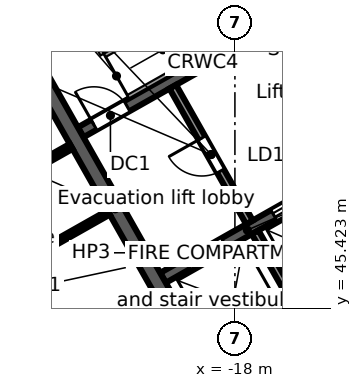
"""IFC4 building model, lengths in metres.
Left out: names, types, materials, properties, quantities, classifications, styles, units other than length and angle.
Written with IfcOpenShell. Run it as: python <this file> out.ifc"""

import sys

from ifc_helpers import new_model, si_unit, direction, frame, frame_2d, origin, place, context, subcontext, project, spatial, rectangle, extrude, element, fill, save


model = new_model("IFC4")
c1 = context("Model", 3, precision=1e-05, world=origin(), true_north=direction((0.0, 1.0)))
c2 = subcontext(c1, "Body", "Model", "MODEL_VIEW")
j1 = project(units=[si_unit("LENGTHUNIT", "METRE"), si_unit("PLANEANGLEUNIT", "RADIAN")], contexts=[c1])
p1 = place(None, origin())
s1 = spatial("IfcSite", under=j1, at=p1, CompositionType="ELEMENT")
p2 = place(p1, origin())
s2 = spatial("IfcBuilding", under=s1, at=p2, CompositionType="ELEMENT")
p3 = place(p2, frame((0.0, 0.0, 274.1)))
s3 = spatial("IfcBuildingStorey", under=s2, at=p3, CompositionType="ELEMENT", Elevation=274.1)
p4 = place(p3, frame((-58.732, 38.771, 0.0), z_axis=(0.0, 0.0, 1.0), x_axis=(0.870355615581, 0.492423702137, 0.0)))
e1 = element("IfcWall", 1, at=p4, inside=s3, PredefinedType="STANDARD", context=c2, shape_type="SweptSolid", body=[
    extrude(rectangle(XDim=64.052, YDim=0.25, at=frame_2d((32.026, 0.0))), origin(), (0.0, 0.0, 1.0), 3.52),
])
p5 = place(p4, frame((61.259, 0.0, 0.8)))
e2 = element("IfcOpeningElement", 2, at=p5, cuts=e1, PredefinedType="OPENING", context=c2, shape_type="SweptSolid", body=[
    extrude(rectangle(XDim=2.4, YDim=2.2, at=frame_2d((1.2, 1.1))), frame((0.0, 0.135, 0.0), z_axis=(0.0, -1.0, 0.0), x_axis=(1.0, 0.0, 0.0)), (0.0, 0.0, 1.0), 0.27),
])
p6 = place(p4, frame((58.216, 0.0, 0.8)))
e3 = element("IfcOpeningElement", 3, at=p6, cuts=e1, PredefinedType="OPENING", context=c2, shape_type="SweptSolid", body=[
    extrude(rectangle(XDim=2.4, YDim=2.2, at=frame_2d((1.2, 1.1))), frame((0.0, 0.135, 0.0), z_axis=(0.0, -1.0, 0.0), x_axis=(1.0, 0.0, 0.0)), (0.0, 0.0, 1.0), 0.27),
])
p7 = place(p4, frame((55.173, 0.0, 0.8)))
e4 = element("IfcOpeningElement", 4, at=p7, cuts=e1, PredefinedType="OPENING", context=c2, shape_type="SweptSolid", body=[
    extrude(rectangle(XDim=2.4, YDim=2.2, at=frame_2d((1.2, 1.1))), frame((0.0, 0.135, 0.0), z_axis=(0.0, -1.0, 0.0), x_axis=(1.0, 0.0, 0.0)), (0.0, 0.0, 1.0), 0.27),
])
p8 = place(p4, frame((52.129, 0.0, 0.8)))
e5 = element("IfcOpeningElement", 5, at=p8, cuts=e1, PredefinedType="OPENING", context=c2, shape_type="SweptSolid", body=[
    extrude(rectangle(XDim=2.4, YDim=2.2, at=frame_2d((1.2, 1.1))), frame((0.0, 0.135, 0.0), z_axis=(0.0, -1.0, 0.0), x_axis=(1.0, 0.0, 0.0)), (0.0, 0.0, 1.0), 0.27),
])
p9 = place(p4, frame((49.086, 0.0, 0.8)))
e6 = element("IfcOpeningElement", 6, at=p9, cuts=e1, PredefinedType="OPENING", context=c2, shape_type="SweptSolid", body=[
    extrude(rectangle(XDim=2.4, YDim=2.2, at=frame_2d((1.2, 1.1))), frame((0.0, 0.135, 0.0), z_axis=(0.0, -1.0, 0.0), x_axis=(1.0, 0.0, 0.0)), (0.0, 0.0, 1.0), 0.27),
])
p10 = place(p4, frame((46.043, 0.0, 0.8)))
e7 = element("IfcOpeningElement", 7, at=p10, cuts=e1, PredefinedType="OPENING", context=c2, shape_type="SweptSolid", body=[
    extrude(rectangle(XDim=2.4, YDim=2.2, at=frame_2d((1.2, 1.1))), frame((0.0, 0.135, 0.0), z_axis=(0.0, -1.0, 0.0), x_axis=(1.0, 0.0, 0.0)), (0.0, 0.0, 1.0), 0.27),
])
p11 = place(p4, frame((43.0, 0.0, 0.8)))
e8 = element("IfcOpeningElement", 8, at=p11, cuts=e1, PredefinedType="OPENING", context=c2, shape_type="SweptSolid", body=[
    extrude(rectangle(XDim=2.4, YDim=2.2, at=frame_2d((1.2, 1.1))), frame((0.0, 0.135, 0.0), z_axis=(0.0, -1.0, 0.0), x_axis=(1.0, 0.0, 0.0)), (0.0, 0.0, 1.0), 0.27),
])
p12 = place(p4, frame((39.956, 0.0, 0.8)))
e9 = element("IfcOpeningElement", 9, at=p12, cuts=e1, PredefinedType="OPENING", context=c2, shape_type="SweptSolid", body=[
    extrude(rectangle(XDim=2.4, YDim=2.2, at=frame_2d((1.2, 1.1))), frame((0.0, 0.135, 0.0), z_axis=(0.0, -1.0, 0.0), x_axis=(1.0, 0.0, 0.0)), (0.0, 0.0, 1.0), 0.27),
])
p13 = place(p4, frame((36.913, 0.0, 0.8)))
e10 = element("IfcOpeningElement", 10, at=p13, cuts=e1, PredefinedType="OPENING", context=c2, shape_type="SweptSolid", body=[
    extrude(rectangle(XDim=2.4, YDim=2.2, at=frame_2d((1.2, 1.1))), frame((0.0, 0.135, 0.0), z_axis=(0.0, -1.0, 0.0), x_axis=(1.0, 0.0, 0.0)), (0.0, 0.0, 1.0), 0.27),
])
p14 = place(p4, frame((33.87, 0.0, 0.8)))
e11 = element("IfcOpeningElement", 11, at=p14, cuts=e1, PredefinedType="OPENING", context=c2, shape_type="SweptSolid", body=[
    extrude(rectangle(XDim=2.4, YDim=2.2, at=frame_2d((1.2, 1.1))), frame((0.0, 0.135, 0.0), z_axis=(0.0, -1.0, 0.0), x_axis=(1.0, 0.0, 0.0)), (0.0, 0.0, 1.0), 0.27),
])
p15 = place(p4, frame((30.826, 0.0, 0.8)))
e12 = element("IfcOpeningElement", 12, at=p15, cuts=e1, PredefinedType="OPENING", context=c2, shape_type="SweptSolid", body=[
    extrude(rectangle(XDim=2.4, YDim=2.2, at=frame_2d((1.2, 1.1))), frame((0.0, 0.135, 0.0), z_axis=(0.0, -1.0, 0.0), x_axis=(1.0, 0.0, 0.0)), (0.0, 0.0, 1.0), 0.27),
])
p16 = place(p4, frame((27.783, 0.0, 0.8)))
e13 = element("IfcOpeningElement", 13, at=p16, cuts=e1, PredefinedType="OPENING", context=c2, shape_type="SweptSolid", body=[
    extrude(rectangle(XDim=2.4, YDim=2.2, at=frame_2d((1.2, 1.1))), frame((0.0, 0.135, 0.0), z_axis=(0.0, -1.0, 0.0), x_axis=(1.0, 0.0, 0.0)), (0.0, 0.0, 1.0), 0.27),
])
p17 = place(p4, frame((24.74, 0.0, 0.8)))
e14 = element("IfcOpeningElement", 14, at=p17, cuts=e1, PredefinedType="OPENING", context=c2, shape_type="SweptSolid", body=[
    extrude(rectangle(XDim=2.4, YDim=2.2, at=frame_2d((1.2, 1.1))), frame((0.0, 0.135, 0.0), z_axis=(0.0, -1.0, 0.0), x_axis=(1.0, 0.0, 0.0)), (0.0, 0.0, 1.0), 0.27),
])
p18 = place(p4, frame((21.696, 0.0, 0.8)))
e15 = element("IfcOpeningElement", 15, at=p18, cuts=e1, PredefinedType="OPENING", context=c2, shape_type="SweptSolid", body=[
    extrude(rectangle(XDim=2.4, YDim=2.2, at=frame_2d((1.2, 1.1))), frame((0.0, 0.135, 0.0), z_axis=(0.0, -1.0, 0.0), x_axis=(1.0, 0.0, 0.0)), (0.0, 0.0, 1.0), 0.27),
])
p19 = place(p4, frame((18.653, 0.0, 0.8)))
e16 = element("IfcOpeningElement", 16, at=p19, cuts=e1, PredefinedType="OPENING", context=c2, shape_type="SweptSolid", body=[
    extrude(rectangle(XDim=2.4, YDim=2.2, at=frame_2d((1.2, 1.1))), frame((0.0, 0.135, 0.0), z_axis=(0.0, -1.0, 0.0), x_axis=(1.0, 0.0, 0.0)), (0.0, 0.0, 1.0), 0.27),
])
p20 = place(p4, frame((15.61, 0.0, 0.8)))
e17 = element("IfcOpeningElement", 17, at=p20, cuts=e1, PredefinedType="OPENING", context=c2, shape_type="SweptSolid", body=[
    extrude(rectangle(XDim=2.4, YDim=2.2, at=frame_2d((1.2, 1.1))), frame((0.0, 0.135, 0.0), z_axis=(0.0, -1.0, 0.0), x_axis=(1.0, 0.0, 0.0)), (0.0, 0.0, 1.0), 0.27),
])
p21 = place(p4, frame((12.567, 0.0, 0.8)))
e18 = element("IfcOpeningElement", 18, at=p21, cuts=e1, PredefinedType="OPENING", context=c2, shape_type="SweptSolid", body=[
    extrude(rectangle(XDim=2.4, YDim=2.2, at=frame_2d((1.2, 1.1))), frame((0.0, 0.135, 0.0), z_axis=(0.0, -1.0, 0.0), x_axis=(1.0, 0.0, 0.0)), (0.0, 0.0, 1.0), 0.27),
])
p22 = place(p4, frame((9.523, 0.0, 0.8)))
e19 = element("IfcOpeningElement", 19, at=p22, cuts=e1, PredefinedType="OPENING", context=c2, shape_type="SweptSolid", body=[
    extrude(rectangle(XDim=2.4, YDim=2.2, at=frame_2d((1.2, 1.1))), frame((0.0, 0.135, 0.0), z_axis=(0.0, -1.0, 0.0), x_axis=(1.0, 0.0, 0.0)), (0.0, 0.0, 1.0), 0.27),
])
p23 = place(p4, frame((6.48, 0.0, 0.8)))
e20 = element("IfcOpeningElement", 20, at=p23, cuts=e1, PredefinedType="OPENING", context=c2, shape_type="SweptSolid", body=[
    extrude(rectangle(XDim=2.4, YDim=2.2, at=frame_2d((1.2, 1.1))), frame((0.0, 0.135, 0.0), z_axis=(0.0, -1.0, 0.0), x_axis=(1.0, 0.0, 0.0)), (0.0, 0.0, 1.0), 0.27),
])
p24 = place(p4, frame((3.437, 0.0, 0.8)))
e21 = element("IfcOpeningElement", 21, at=p24, cuts=e1, PredefinedType="OPENING", context=c2, shape_type="SweptSolid", body=[
    extrude(rectangle(XDim=2.4, YDim=2.2, at=frame_2d((1.2, 1.1))), frame((0.0, 0.135, 0.0), z_axis=(0.0, -1.0, 0.0), x_axis=(1.0, 0.0, 0.0)), (0.0, 0.0, 1.0), 0.27),
])
p25 = place(p4, frame((0.393, 0.0, 0.8)))
e22 = element("IfcOpeningElement", 22, at=p25, cuts=e1, PredefinedType="OPENING", context=c2, shape_type="SweptSolid", body=[
    extrude(rectangle(XDim=2.4, YDim=2.2, at=frame_2d((1.2, 1.1))), frame((0.0, 0.135, 0.0), z_axis=(0.0, -1.0, 0.0), x_axis=(1.0, 0.0, 0.0)), (0.0, 0.0, 1.0), 0.27),
])
p26 = place(p3, frame((-3.017, 46.293, 0.0), z_axis=(0.0, 0.0, 1.0), x_axis=(-0.870355474887, -0.492423950812, 0.0)))
e23 = element("IfcWall", 23, at=p26, inside=s3, PredefinedType="STANDARD", context=c2, shape_type="SweptSolid", body=[
    extrude(rectangle(XDim=40.34, YDim=0.25, at=frame_2d((20.17, 0.0))), origin(), (0.0, 0.0, 1.0), 3.52),
])
p27 = place(p26, frame((37.428, 0.0, 0.8)))
e24 = element("IfcOpeningElement", 24, at=p27, cuts=e23, PredefinedType="OPENING", context=c2, shape_type="SweptSolid", body=[
    extrude(rectangle(XDim=2.4, YDim=2.2, at=frame_2d((1.2, 1.1))), frame((0.0, 0.135, 0.0), z_axis=(0.0, -1.0, 0.0), x_axis=(1.0, 0.0, 0.0)), (0.0, 0.0, 1.0), 0.27),
])
p28 = place(p26, frame((34.372, 0.0, 0.0)))
e25 = element("IfcOpeningElement", 25, at=p28, cuts=e23, PredefinedType="OPENING", context=c2, shape_type="SweptSolid", body=[
    extrude(rectangle(XDim=1.8, YDim=2.4, at=frame_2d((0.9, 1.2))), frame((0.0, 0.135, 0.0), z_axis=(0.0, -1.0, 0.0), x_axis=(1.0, 0.0, 0.0)), (0.0, 0.0, 1.0), 0.27),
])
p29 = place(p26, frame((30.716, 0.0, 0.8)))
e26 = element("IfcOpeningElement", 26, at=p29, cuts=e23, PredefinedType="OPENING", context=c2, shape_type="SweptSolid", body=[
    extrude(rectangle(XDim=2.4, YDim=2.2, at=frame_2d((1.2, 1.1))), frame((0.0, 0.135, 0.0), z_axis=(0.0, -1.0, 0.0), x_axis=(1.0, 0.0, 0.0)), (0.0, 0.0, 1.0), 0.27),
])
p30 = place(p26, frame((27.36, 0.0, 0.8)))
e27 = element("IfcOpeningElement", 27, at=p30, cuts=e23, PredefinedType="OPENING", context=c2, shape_type="SweptSolid", body=[
    extrude(rectangle(XDim=2.4, YDim=2.2, at=frame_2d((1.2, 1.1))), frame((0.0, 0.135, 0.0), z_axis=(0.0, -1.0, 0.0), x_axis=(1.0, 0.0, 0.0)), (0.0, 0.0, 1.0), 0.27),
])
p31 = place(p26, frame((24.304, 0.0, 0.0)))
e28 = element("IfcOpeningElement", 28, at=p31, cuts=e23, PredefinedType="OPENING", context=c2, shape_type="SweptSolid", body=[
    extrude(rectangle(XDim=1.8, YDim=2.4, at=frame_2d((0.9, 1.2))), frame((0.0, 0.135, 0.0), z_axis=(0.0, -1.0, 0.0), x_axis=(1.0, 0.0, 0.0)), (0.0, 0.0, 1.0), 0.27),
])
p32 = place(p26, frame((20.648, 0.0, 0.8)))
e29 = element("IfcOpeningElement", 29, at=p32, cuts=e23, PredefinedType="OPENING", context=c2, shape_type="SweptSolid", body=[
    extrude(rectangle(XDim=2.4, YDim=2.2, at=frame_2d((1.2, 1.1))), frame((0.0, 0.135, 0.0), z_axis=(0.0, -1.0, 0.0), x_axis=(1.0, 0.0, 0.0)), (0.0, 0.0, 1.0), 0.27),
])
p33 = place(p26, frame((17.292, 0.0, 0.8)))
e30 = element("IfcOpeningElement", 30, at=p33, cuts=e23, PredefinedType="OPENING", context=c2, shape_type="SweptSolid", body=[
    extrude(rectangle(XDim=2.4, YDim=2.2, at=frame_2d((1.2, 1.1))), frame((0.0, 0.135, 0.0), z_axis=(0.0, -1.0, 0.0), x_axis=(1.0, 0.0, 0.0)), (0.0, 0.0, 1.0), 0.27),
])
p34 = place(p26, frame((14.236, 0.0, 0.0)))
e31 = element("IfcOpeningElement", 31, at=p34, cuts=e23, PredefinedType="OPENING", context=c2, shape_type="SweptSolid", body=[
    extrude(rectangle(XDim=1.8, YDim=2.4, at=frame_2d((0.9, 1.2))), frame((0.0, 0.135, 0.0), z_axis=(0.0, -1.0, 0.0), x_axis=(1.0, 0.0, 0.0)), (0.0, 0.0, 1.0), 0.27),
])
p35 = place(p26, frame((10.58, 0.0, 0.8)))
e32 = element("IfcOpeningElement", 32, at=p35, cuts=e23, PredefinedType="OPENING", context=c2, shape_type="SweptSolid", body=[
    extrude(rectangle(XDim=2.4, YDim=2.2, at=frame_2d((1.2, 1.1))), frame((0.0, 0.135, 0.0), z_axis=(0.0, -1.0, 0.0), x_axis=(1.0, 0.0, 0.0)), (0.0, 0.0, 1.0), 0.27),
])
p36 = place(p26, frame((7.224, 0.0, 0.8)))
e33 = element("IfcOpeningElement", 33, at=p36, cuts=e23, PredefinedType="OPENING", context=c2, shape_type="SweptSolid", body=[
    extrude(rectangle(XDim=2.4, YDim=2.2, at=frame_2d((1.2, 1.1))), frame((0.0, 0.135, 0.0), z_axis=(0.0, -1.0, 0.0), x_axis=(1.0, 0.0, 0.0)), (0.0, 0.0, 1.0), 0.27),
])
p37 = place(p26, frame((4.168, 0.0, 0.0)))
e34 = element("IfcOpeningElement", 34, at=p37, cuts=e23, PredefinedType="OPENING", context=c2, shape_type="SweptSolid", body=[
    extrude(rectangle(XDim=1.8, YDim=2.4, at=frame_2d((0.9, 1.2))), frame((0.0, 0.135, 0.0), z_axis=(0.0, -1.0, 0.0), x_axis=(1.0, 0.0, 0.0)), (0.0, 0.0, 1.0), 0.27),
])
p38 = place(p26, frame((0.512, 0.0, 0.8)))
e35 = element("IfcOpeningElement", 35, at=p38, cuts=e23, PredefinedType="OPENING", context=c2, shape_type="SweptSolid", body=[
    extrude(rectangle(XDim=2.4, YDim=2.2, at=frame_2d((1.2, 1.1))), frame((0.0, 0.135, 0.0), z_axis=(0.0, -1.0, 0.0), x_axis=(1.0, 0.0, 0.0)), (0.0, 0.0, 1.0), 0.27),
])
p39 = place(p3, frame((-17.975, 42.017, 0.0), z_axis=(0.0, 0.0, 1.0), x_axis=(0.87034965173, 0.492434243055, 0.0)))
e36 = element("IfcWall", 36, at=p39, inside=s3, PredefinedType="SOLIDWALL", context=c2, shape_type="SweptSolid", body=[
    extrude(rectangle(XDim=15.0, YDim=0.4, at=frame_2d((7.5, 0.0))), origin(), (0.0, 0.0, 1.0), 3.52),
])
p40 = place(p39, frame((6.1, 0.0, 0.0)))
e37 = element("IfcOpeningElement", 37, at=p40, cuts=e36, PredefinedType="OPENING", context=c2, shape_type="SweptSolid", body=[
    extrude(rectangle(XDim=1.2, YDim=2.1, at=frame_2d((0.6, 1.05))), frame((0.0, 0.21, 0.0), z_axis=(0.0, -1.0, 0.0), x_axis=(1.0, 0.0, 0.0)), (0.0, 0.0, 1.0), 0.42),
])
p41 = place(p3, frame((-19.892, 46.218, 0.0), z_axis=(0.0, 0.0, 1.0), x_axis=(0.870341639186, 0.492448404505, 0.0)))
e38 = element("IfcWall", 38, at=p41, inside=s3, PredefinedType="SOLIDWALL", context=c2, shape_type="SweptSolid", body=[
    extrude(rectangle(XDim=5.1, YDim=0.3, at=frame_2d((2.55, 0.0))), origin(), (0.0, 0.0, 1.0), 3.52),
])
p42 = place(p41, frame((0.75, 0.0, 0.0)))
e39 = element("IfcOpeningElement", 39, at=p42, cuts=e38, PredefinedType="OPENING", context=c2, shape_type="SweptSolid", body=[
    extrude(rectangle(XDim=1.1, YDim=2.1, at=frame_2d((0.55, 1.05))), frame((0.0, 0.16, 0.0), z_axis=(0.0, -1.0, 0.0), x_axis=(1.0, 0.0, 0.0)), (0.0, 0.0, 1.0), 0.32),
])
p43 = place(p41, frame((3.35, 0.0, 0.0)))
e40 = element("IfcOpeningElement", 40, at=p43, cuts=e38, PredefinedType="OPENING", context=c2, shape_type="SweptSolid", body=[
    extrude(rectangle(XDim=1.1, YDim=2.1, at=frame_2d((0.55, 1.05))), frame((0.0, 0.16, 0.0), z_axis=(0.0, -1.0, 0.0), x_axis=(1.0, 0.0, 0.0)), (0.0, 0.0, 1.0), 0.32),
])
p44 = place(p3, frame((-22.059, 50.047, 0.0), z_axis=(0.0, 0.0, 1.0), x_axis=(0.87035077051, 0.49243226567, 0.0)))
e41 = element("IfcWall", 41, at=p44, inside=s3, PredefinedType="SOLIDWALL", context=c2, shape_type="SweptSolid", body=[
    extrude(rectangle(XDim=7.4, YDim=0.3, at=frame_2d((3.7, 0.0))), origin(), (0.0, 0.0, 1.0), 3.52),
])
p45 = place(p44, frame((0.4, 0.0, 0.0)))
e42 = element("IfcOpeningElement", 42, at=p45, cuts=e41, PredefinedType="OPENING", context=c2, shape_type="SweptSolid", body=[
    extrude(rectangle(XDim=1.0, YDim=2.1, at=frame_2d((0.5, 1.05))), frame((0.0, 0.16, 0.0), z_axis=(0.0, -1.0, 0.0), x_axis=(1.0, 0.0, 0.0)), (0.0, 0.0, 1.0), 0.32),
])
p46 = place(p3, frame((-24.4, 53.779, 0.0), z_axis=(0.0, 0.0, 1.0), x_axis=(0.492421663121, -0.870356769198, 0.0)))
e43 = element("IfcWall", 43, at=p46, inside=s3, PredefinedType="SOLIDWALL", context=c2, shape_type="SweptSolid", body=[
    extrude(rectangle(XDim=13.2, YDim=0.4, at=frame_2d((6.6, 0.0))), origin(), (0.0, 0.0, 1.0), 3.52),
])
p47 = place(p3, frame((-17.469, 47.417, 0.0), z_axis=(0.0, 0.0, 1.0), x_axis=(0.492466057713, -0.870331650579, 0.0)))
e44 = element("IfcWall", 44, at=p47, inside=s3, PredefinedType="SOLIDWALL", context=c2, shape_type="SweptSolid", body=[
    extrude(rectangle(XDim=4.25, YDim=0.2, at=frame_2d((2.125, 0.0))), origin(), (0.0, 0.0, 1.0), 3.52),
])
p48 = place(p3, frame((-19.635, 51.246, 0.0), z_axis=(0.0, 0.0, 1.0), x_axis=(0.492408451753, -0.87036424366, 0.0)))
e45 = element("IfcWall", 45, at=p48, inside=s3, PredefinedType="PARTITIONING", context=c2, shape_type="SweptSolid", body=[
    extrude(rectangle(XDim=4.1, YDim=0.2, at=frame_2d((2.05, 0.0))), origin(), (0.0, 0.0, 1.0), 3.52),
])
p49 = place(p48, frame((1.55, 0.0, 0.0)))
e46 = element("IfcOpeningElement", 46, at=p49, cuts=e45, PredefinedType="OPENING", context=c2, shape_type="SweptSolid", body=[
    extrude(rectangle(XDim=1.0, YDim=2.1, at=frame_2d((0.5, 1.05))), frame((0.0, 0.11, 0.0), z_axis=(0.0, -1.0, 0.0), x_axis=(1.0, 0.0, 0.0)), (0.0, 0.0, 1.0), 0.22),
])
p50 = place(p3, frame((-27.827, 46.554, 0.0), z_axis=(0.0, 0.0, 1.0), x_axis=(0.870339695563, 0.492451839602, 0.0)))
e47 = element("IfcWall", 47, at=p50, inside=s3, PredefinedType="PARTITIONING", context=c2, shape_type="SweptSolid", body=[
    extrude(rectangle(XDim=6.34, YDim=0.15, at=frame_2d((3.17, 0.0))), origin(), (0.0, 0.0, 1.0), 2.792),
])
p51 = place(p3, frame((-26.842, 44.813, 0.0), z_axis=(0.0, 0.0, 1.0), x_axis=(0.870283015025, 0.492552001071, 0.0)))
e48 = element("IfcWall", 48, at=p51, inside=s3, PredefinedType="PARTITIONING", context=c2, shape_type="SweptSolid", body=[
    extrude(rectangle(XDim=6.341, YDim=0.125, at=frame_2d((3.17, 0.0))), origin(), (0.0, 0.0, 1.0), 2.792),
])
p52 = place(p42, origin())
e49 = element("IfcDoor", 49, at=p52, inside=s3, OperationType="DOUBLE_DOOR_SLIDING", PredefinedType="DOOR", context=c2, shape_type="SweptSolid", body=[
    extrude(rectangle(XDim=1.1, YDim=2.1, at=frame_2d((0.55, 1.05))), frame((0.0, 0.025, 0.0), z_axis=(0.0, -1.0, 0.0), x_axis=(1.0, 0.0, 0.0)), (0.0, 0.0, 1.0), 0.05),
])
fill(e39, e49)
p53 = place(p43, origin())
e50 = element("IfcDoor", 50, at=p53, inside=s3, OperationType="DOUBLE_DOOR_SLIDING", PredefinedType="DOOR", context=c2, shape_type="SweptSolid", body=[
    extrude(rectangle(XDim=1.1, YDim=2.1, at=frame_2d((0.55, 1.05))), frame((0.0, 0.025, 0.0), z_axis=(0.0, -1.0, 0.0), x_axis=(1.0, 0.0, 0.0)), (0.0, 0.0, 1.0), 0.05),
])
fill(e40, e50)
p54 = place(p45, origin())
e51 = element("IfcDoor", 51, at=p54, inside=s3, OperationType="SINGLE_SWING_LEFT", PredefinedType="DOOR", context=c2, shape_type="SweptSolid", body=[
    extrude(rectangle(XDim=1.0, YDim=2.1, at=frame_2d((0.5, 1.05))), frame((0.0, 0.025, 0.0), z_axis=(0.0, -1.0, 0.0), x_axis=(1.0, 0.0, 0.0)), (0.0, 0.0, 1.0), 0.05),
])
fill(e42, e51)
p55 = place(p49, frame((1.0, 0.0, 0.0), z_axis=(0.0, 0.0, 1.0), x_axis=(-1.0, 0.0, 0.0)))
e52 = element("IfcDoor", 52, at=p55, inside=s3, OperationType="SINGLE_SWING_RIGHT", PredefinedType="DOOR", context=c2, shape_type="SweptSolid", body=[
    extrude(rectangle(XDim=1.0, YDim=2.1, at=frame_2d((0.5, 1.05))), frame((0.0, 0.025, 0.0), z_axis=(0.0, -1.0, 0.0), x_axis=(1.0, 0.0, 0.0)), (0.0, 0.0, 1.0), 0.05),
])
fill(e46, e52)
save(model, sys.argv[1])
